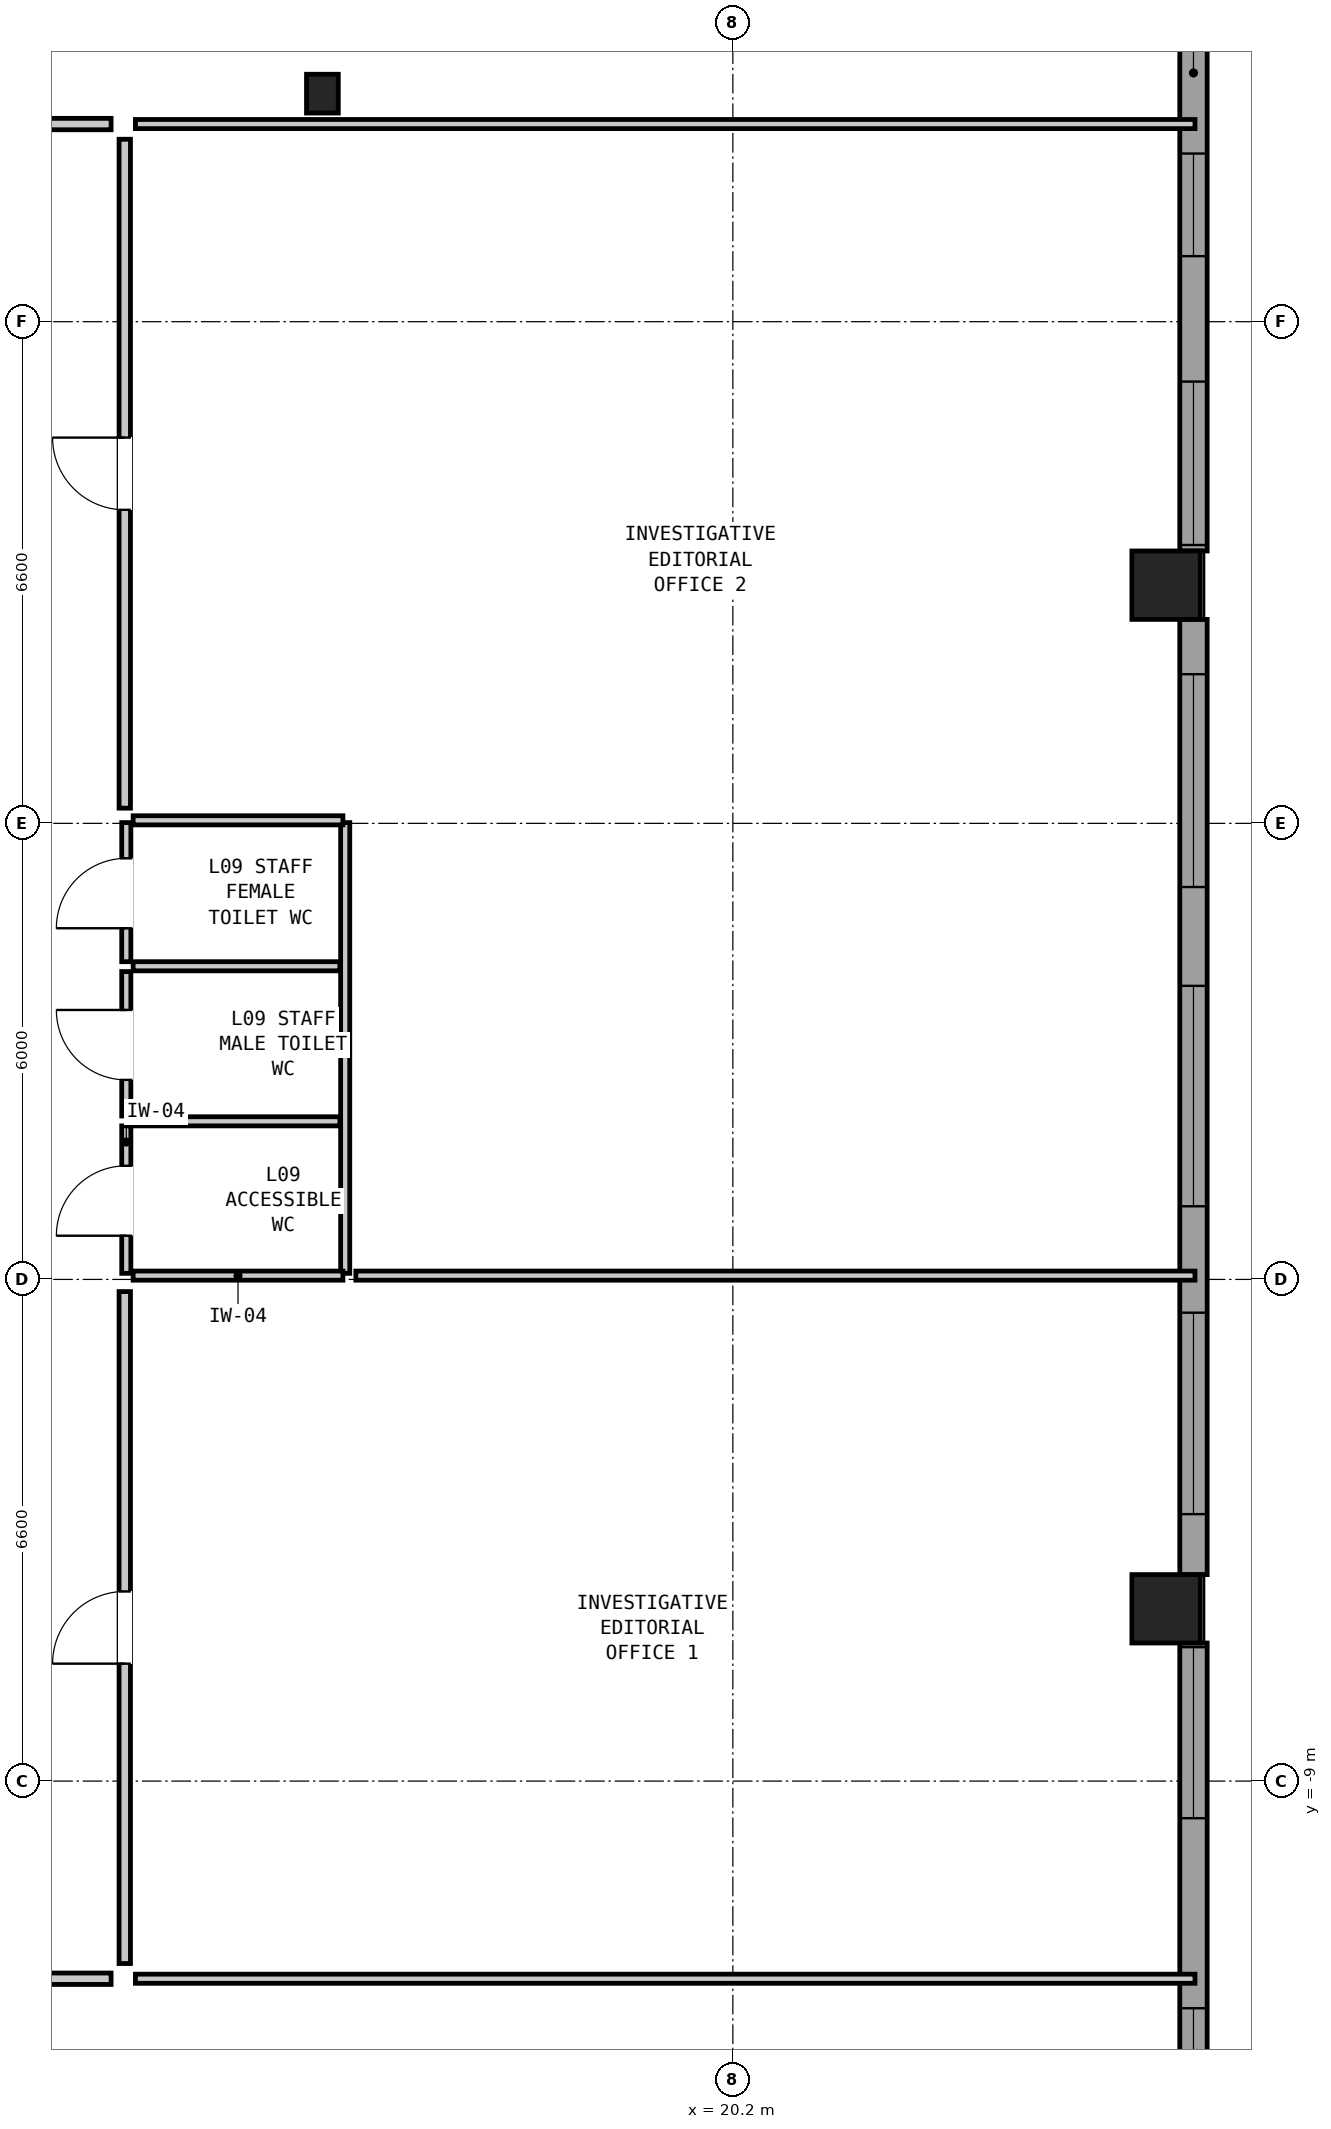
"""IFC4 building model, lengths in metres.
Left out: names, types, materials, properties, quantities, classifications, styles, units other than length and angle.
Written with IfcOpenShell. Run it as: python <this file> out.ifc"""

import sys

from ifc_helpers import new_model, si_unit, direction, frame, frame_2d, origin, origin_2d, place, context, subcontext, project, spatial, rectangle, hollow_rectangle, i_section, extrude, element, fill, save


model = new_model("IFC4")
c1 = context("Model", 3, precision=1e-05, world=origin(), true_north=direction((0.0, 1.0)))
c2 = subcontext(c1, "Body", "Model", "MODEL_VIEW")
j1 = project(units=[si_unit("LENGTHUNIT", "METRE"), si_unit("PLANEANGLEUNIT", "RADIAN")], contexts=[c1])
p1 = place(None, origin())
s1 = spatial("IfcSite", under=j1, at=p1, CompositionType="ELEMENT")
p2 = place(p1, origin())
s2 = spatial("IfcBuilding", under=s1, at=p2, CompositionType="ELEMENT")
p3 = place(p2, frame((0.0, 0.0, 35.25)))
s3 = spatial("IfcBuildingStorey", under=s2, at=p3, CompositionType="ELEMENT", Elevation=35.25)
for number, where, z_axis, x_axis in (
    (1, (25.9, -6.733, 0.0), (0.0, 0.0, 1.0), (0.0, 1.0, 0.0)),
    (2, (25.9, 6.733, 0.0), (0.0, 0.0, 1.0), (0.0, 1.0, 0.0)),
):
    element("IfcColumn", number, at=place(p3, frame(where, z_axis=z_axis, x_axis=x_axis)), inside=s3, PredefinedType="COLUMN", context=c2, shape_type="SweptSolid", body=[
        extrude(hollow_rectangle(XDim=0.9, YDim=0.9, WallThickness=0.055, at=origin_2d()), origin(), (0.0, 0.0, 1.0), 3.05),
    ])
p4 = place(p3, frame((14.8, 13.2, 0.0), z_axis=(0.0, 0.0, 1.0), x_axis=(1.0, 0.0, 0.0)))
e3 = element("IfcColumn", 3, at=p4, inside=s3, PredefinedType="COLUMN", context=c2, shape_type="SweptSolid", body=[
    extrude(i_section(OverallWidth=0.418, OverallDepth=0.51, WebThickness=0.042, FlangeThickness=0.068, at=origin_2d()), origin(), (0.0, 0.0, 1.0), 3.05),
])
p5 = place(p3, frame((26.26, 19.762, 0.0), z_axis=(0.0, 0.0, 1.0), x_axis=(0.0, -1.0, 0.0)))
e4 = element("IfcWall", 4, at=p5, inside=s3, PredefinedType="SOLIDWALL", context=c2, shape_type="SweptSolid", body=[
    extrude(rectangle(XDim=12.579, YDim=0.36, at=frame_2d((6.289, 0.0))), origin(), (0.0, 0.0, 1.0), 2.067),
])
p6 = place(p5, frame((1.8, 0.0, 0.2)))
e5 = element("IfcOpeningElement", 5, at=p6, cuts=e4, PredefinedType="OPENING", context=c2, shape_type="SweptSolid", body=[
    extrude(rectangle(XDim=2.65, YDim=1.05, at=frame_2d((1.325, 0.525))), frame((0.0, 0.192, 0.0), z_axis=(0.0, -1.0, 0.0), x_axis=(1.0, 0.0, 0.0)), (0.0, 0.0, 1.0), 0.384),
])
p7 = place(p5, frame((7.35, 0.0, 0.9)))
e6 = element("IfcOpeningElement", 6, at=p7, cuts=e4, PredefinedType="OPENING", context=c2, shape_type="SweptSolid", body=[
    extrude(rectangle(XDim=1.35, YDim=1.0, at=frame_2d((0.675, 0.5))), frame((0.0, 0.192, 0.0), z_axis=(0.0, -1.0, 0.0), x_axis=(1.0, 0.0, 0.0)), (0.0, 0.0, 1.0), 0.384),
])
p8 = place(p5, frame((10.35, 0.0, 0.2)))
e7 = element("IfcOpeningElement", 7, at=p8, cuts=e4, PredefinedType="OPENING", context=c2, shape_type="SweptSolid", body=[
    extrude(rectangle(XDim=2.15, YDim=1.2, at=frame_2d((1.075, 0.6))), frame((0.0, 0.192, 0.0), z_axis=(0.0, -1.0, 0.0), x_axis=(1.0, 0.0, 0.0)), (0.0, 0.0, 1.0), 0.384),
])
p9 = place(p3, frame((26.26, 6.283, 0.0), z_axis=(0.0, 0.0, 1.0), x_axis=(0.0, -1.0, 0.0)))
e8 = element("IfcWall", 8, at=p9, inside=s3, PredefinedType="SOLIDWALL", context=c2, shape_type="SweptSolid", body=[
    extrude(rectangle(XDim=12.566, YDim=0.36, at=frame_2d((6.283, 0.0))), origin(), (0.0, 0.0, 1.0), 2.067),
])
p10 = place(p9, frame((0.721, 0.0, 0.9)))
e9 = element("IfcOpeningElement", 9, at=p10, cuts=e8, PredefinedType="OPENING", context=c2, shape_type="SweptSolid", body=[
    extrude(rectangle(XDim=2.8, YDim=1.0, at=frame_2d((1.4, 0.5))), frame((0.0, 0.192, 0.0), z_axis=(0.0, -1.0, 0.0), x_axis=(1.0, 0.0, 0.0)), (0.0, 0.0, 1.0), 0.384),
])
p11 = place(p9, frame((4.821, 0.0, 0.2)))
e10 = element("IfcOpeningElement", 10, at=p11, cuts=e8, PredefinedType="OPENING", context=c2, shape_type="SweptSolid", body=[
    extrude(rectangle(XDim=2.9, YDim=0.95, at=frame_2d((1.45, 0.475))), frame((0.0, 0.192, 0.0), z_axis=(0.0, -1.0, 0.0), x_axis=(1.0, 0.0, 0.0)), (0.0, 0.0, 1.0), 0.384),
])
p12 = place(p9, frame((9.121, 0.0, 0.85)))
e11 = element("IfcOpeningElement", 11, at=p12, cuts=e8, PredefinedType="OPENING", context=c2, shape_type="SweptSolid", body=[
    extrude(rectangle(XDim=2.65, YDim=1.05, at=frame_2d((1.325, 0.525))), frame((0.0, 0.192, 0.0), z_axis=(0.0, -1.0, 0.0), x_axis=(1.0, 0.0, 0.0)), (0.0, 0.0, 1.0), 0.384),
])
p13 = place(p3, frame((26.26, -7.183, 0.0), z_axis=(0.0, 0.0, 1.0), x_axis=(0.0, -1.0, 0.0)))
e12 = element("IfcWall", 12, at=p13, inside=s3, PredefinedType="SOLIDWALL", context=c2, shape_type="SweptSolid", body=[
    extrude(rectangle(XDim=12.579, YDim=0.36, at=frame_2d((6.289, 0.0))), origin(), (0.0, 0.0, 1.0), 2.067),
])
p14 = place(p13, frame((0.055, 0.0, 0.2)))
e13 = element("IfcOpeningElement", 13, at=p14, cuts=e12, PredefinedType="OPENING", context=c2, shape_type="SweptSolid", body=[
    extrude(rectangle(XDim=2.25, YDim=1.15, at=frame_2d((1.125, 0.575))), frame((0.0, 0.192, 0.0), z_axis=(0.0, -1.0, 0.0), x_axis=(1.0, 0.0, 0.0)), (0.0, 0.0, 1.0), 0.384),
])
p15 = place(p13, frame((4.805, 0.0, 0.8)))
e14 = element("IfcOpeningElement", 14, at=p15, cuts=e12, PredefinedType="OPENING", context=c2, shape_type="SweptSolid", body=[
    extrude(rectangle(XDim=1.75, YDim=1.1, at=frame_2d((0.875, 0.55))), frame((0.0, 0.192, 0.0), z_axis=(0.0, -1.0, 0.0), x_axis=(1.0, 0.0, 0.0)), (0.0, 0.0, 1.0), 0.384),
])
p16 = place(p13, frame((8.055, 0.0, 0.2)))
e15 = element("IfcOpeningElement", 15, at=p16, cuts=e12, PredefinedType="OPENING", context=c2, shape_type="SweptSolid", body=[
    extrude(rectangle(XDim=2.8, YDim=1.0, at=frame_2d((1.4, 0.5))), frame((0.0, 0.192, 0.0), z_axis=(0.0, -1.0, 0.0), x_axis=(1.0, 0.0, 0.0)), (0.0, 0.0, 1.0), 0.384),
])
p17 = place(p3, frame((12.22, -2.32, 0.0), z_axis=(0.0, 0.0, 1.0), x_axis=(0.0, 1.0, 0.0)))
e16 = element("IfcWall", 16, at=p17, inside=s3, PredefinedType="PARTITIONING", context=c2, shape_type="SweptSolid", body=[
    extrude(rectangle(XDim=1.94, YDim=0.12, at=frame_2d((0.97, 0.0))), origin(), (0.0, 0.0, 1.0), 2.83),
])
p18 = place(p17, frame((0.495, 0.0, 0.0)))
e17 = element("IfcOpeningElement", 17, at=p18, cuts=e16, PredefinedType="OPENING", context=c2, shape_type="SweptSolid", body=[
    extrude(rectangle(XDim=0.92, YDim=2.1, at=frame_2d((0.46, 1.05))), frame((0.0, 0.072, 0.0), z_axis=(0.0, -1.0, 0.0), x_axis=(1.0, 0.0, 0.0)), (0.0, 0.0, 1.0), 0.144),
])
p19 = place(p3, frame((12.22, -0.25, 0.0), z_axis=(0.0, 0.0, 1.0), x_axis=(0.0, 1.0, 0.0)))
e18 = element("IfcWall", 18, at=p19, inside=s3, PredefinedType="PARTITIONING", context=c2, shape_type="SweptSolid", body=[
    extrude(rectangle(XDim=1.9, YDim=0.12, at=frame_2d((0.95, 0.0))), origin(), (0.0, 0.0, 1.0), 2.83),
])
p20 = place(p19, frame((0.475, 0.0, 0.0)))
e19 = element("IfcOpeningElement", 19, at=p20, cuts=e18, PredefinedType="OPENING", context=c2, shape_type="SweptSolid", body=[
    extrude(rectangle(XDim=0.92, YDim=2.1, at=frame_2d((0.46, 1.05))), frame((0.0, 0.072, 0.0), z_axis=(0.0, -1.0, 0.0), x_axis=(1.0, 0.0, 0.0)), (0.0, 0.0, 1.0), 0.144),
])
p21 = place(p3, frame((12.22, 1.78, 0.0), z_axis=(0.0, 0.0, 1.0), x_axis=(0.0, 1.0, 0.0)))
e20 = element("IfcWall", 20, at=p21, inside=s3, PredefinedType="PARTITIONING", context=c2, shape_type="SweptSolid", body=[
    extrude(rectangle(XDim=1.83, YDim=0.12, at=frame_2d((0.915, 0.0))), origin(), (0.0, 0.0, 1.0), 2.83),
])
p22 = place(p21, frame((0.44, 0.0, 0.0)))
e21 = element("IfcOpeningElement", 21, at=p22, cuts=e20, PredefinedType="OPENING", context=c2, shape_type="SweptSolid", body=[
    extrude(rectangle(XDim=0.92, YDim=2.1, at=frame_2d((0.46, 1.05))), frame((0.0, 0.072, 0.0), z_axis=(0.0, -1.0, 0.0), x_axis=(1.0, 0.0, 0.0)), (0.0, 0.0, 1.0), 0.144),
])
p23 = place(p3, frame((15.1, -2.32, 0.0), z_axis=(0.0, 0.0, 1.0), x_axis=(0.0, 1.0, 0.0)))
e22 = element("IfcWall", 22, at=p23, inside=s3, PredefinedType="PARTITIONING", context=c2, shape_type="SweptSolid", body=[
    extrude(rectangle(XDim=5.93, YDim=0.12, at=frame_2d((2.965, 0.0))), origin(), (0.0, 0.0, 1.0), 2.83),
])
for number, where, z_axis, x_axis in (
    (23, (12.31, -2.35, 0.0), (0.0, 0.0, 1.0), (1.0, 0.0, 0.0)),
    (24, (12.31, 3.64, 0.0), (0.0, 0.0, 1.0), (1.0, 0.0, 0.0)),
):
    element("IfcWall", number, at=place(p3, frame(where, z_axis=z_axis, x_axis=x_axis)), inside=s3, PredefinedType="PARTITIONING", context=c2, shape_type="SweptSolid", body=[
        extrude(rectangle(XDim=2.76, YDim=0.12, at=frame_2d((1.38, 0.0))), origin(), (0.0, 0.0, 1.0), 1.799),
    ])
for number, where, z_axis, x_axis in (
    (25, (12.31, -0.32, 0.0), (0.0, 0.0, 1.0), (1.0, 0.0, 0.0)),
    (26, (12.31, 1.72, 0.0), (0.0, 0.0, 1.0), (1.0, 0.0, 0.0)),
):
    element("IfcWall", number, at=place(p3, frame(where, z_axis=z_axis, x_axis=x_axis)), inside=s3, PredefinedType="PARTITIONING", context=c2, shape_type="SweptSolid", body=[
        extrude(rectangle(XDim=2.72, YDim=0.12, at=frame_2d((1.36, 0.0))), origin(), (0.0, 0.0, 1.0), 2.83),
    ])
p24 = place(p3, frame((12.34, 12.8, 0.0), z_axis=(0.0, 0.0, 1.0), x_axis=(1.0, 0.0, 0.0)))
e27 = element("IfcWall", 27, at=p24, inside=s3, PredefinedType="PARTITIONING", context=c2, shape_type="SweptSolid", body=[
    extrude(rectangle(XDim=13.94, YDim=0.12, at=frame_2d((6.97, 0.0))), origin(), (0.0, 0.0, 1.0), 2.83),
])
p25 = place(p3, frame((12.34, -11.6, 0.0), z_axis=(0.0, 0.0, 1.0), x_axis=(1.0, 0.0, 0.0)))
e28 = element("IfcWall", 28, at=p25, inside=s3, PredefinedType="PARTITIONING", context=c2, shape_type="SweptSolid", body=[
    extrude(rectangle(XDim=13.94, YDim=0.12, at=frame_2d((6.97, 0.0))), origin(), (0.0, 0.0, 1.0), 2.274),
])
p26 = place(p3, frame((15.24, -2.35, 0.0), z_axis=(0.0, 0.0, 1.0), x_axis=(1.0, 0.0, 0.0)))
e29 = element("IfcWall", 29, at=p26, inside=s3, PredefinedType="PARTITIONING", context=c2, shape_type="SweptSolid", body=[
    extrude(rectangle(XDim=11.04, YDim=0.12, at=frame_2d((5.52, 0.0))), origin(), (0.0, 0.0, 1.0), 1.799),
])
p27 = place(p3, frame((8.58, 12.8, 0.0), z_axis=(0.0, 0.0, 1.0), x_axis=(1.0, 0.0, 0.0)))
e30 = element("IfcWall", 30, at=p27, inside=s3, PredefinedType="PARTITIONING", context=c2, shape_type="SweptSolid", body=[
    extrude(rectangle(XDim=3.44, YDim=0.15, at=frame_2d((1.72, 0.0))), origin(), (0.0, 0.0, 1.0), 2.83),
])
p28 = place(p27, frame((1.245, 0.0, 0.0)))
e31 = element("IfcOpeningElement", 31, at=p28, cuts=e30, PredefinedType="OPENING", context=c2, shape_type="SweptSolid", body=[
    extrude(rectangle(XDim=0.95, YDim=2.1, at=frame_2d((0.475, 1.05))), frame((0.0, 0.087, 0.0), z_axis=(0.0, -1.0, 0.0), x_axis=(1.0, 0.0, 0.0)), (0.0, 0.0, 1.0), 0.174),
])
p29 = place(p3, frame((8.58, -11.6, 0.0), z_axis=(0.0, 0.0, 1.0), x_axis=(1.0, 0.0, 0.0)))
e32 = element("IfcWall", 32, at=p29, inside=s3, PredefinedType="PARTITIONING", context=c2, shape_type="SweptSolid", body=[
    extrude(rectangle(XDim=3.44, YDim=0.15, at=frame_2d((1.72, 0.0))), origin(), (0.0, 0.0, 1.0), 2.274),
])
p30 = place(p29, frame((1.245, 0.0, 0.0)))
e33 = element("IfcOpeningElement", 33, at=p30, cuts=e32, PredefinedType="OPENING", context=c2, shape_type="SweptSolid", body=[
    extrude(rectangle(XDim=0.95, YDim=2.1, at=frame_2d((0.475, 1.05))), frame((0.0, 0.087, 0.0), z_axis=(0.0, -1.0, 0.0), x_axis=(1.0, 0.0, 0.0)), (0.0, 0.0, 1.0), 0.174),
])
p31 = place(p3, frame((12.2, -11.4, 0.0), z_axis=(0.0, 0.0, 1.0), x_axis=(0.0, 1.0, 0.0)))
e34 = element("IfcWall", 34, at=p31, inside=s3, PredefinedType="PARTITIONING", context=c2, shape_type="SweptSolid", body=[
    extrude(rectangle(XDim=8.84, YDim=0.15, at=frame_2d((4.42, 0.0))), origin(), (0.0, 0.0, 1.0), 2.83),
])
p32 = place(p31, frame((3.945, 0.0, 0.0)))
e35 = element("IfcOpeningElement", 35, at=p32, cuts=e34, PredefinedType="OPENING", context=c2, shape_type="SweptSolid", body=[
    extrude(rectangle(XDim=0.95, YDim=2.1, at=frame_2d((0.475, 1.05))), frame((0.0, 0.087, 0.0), z_axis=(0.0, -1.0, 0.0), x_axis=(1.0, 0.0, 0.0)), (0.0, 0.0, 1.0), 0.174),
])
p33 = place(p3, frame((12.2, 3.8, 0.0), z_axis=(0.0, 0.0, 1.0), x_axis=(0.0, 1.0, 0.0)))
e36 = element("IfcWall", 36, at=p33, inside=s3, PredefinedType="PARTITIONING", context=c2, shape_type="SweptSolid", body=[
    extrude(rectangle(XDim=8.8, YDim=0.15, at=frame_2d((4.4, 0.0))), origin(), (0.0, 0.0, 1.0), 2.83),
])
p34 = place(p33, frame((3.925, 0.0, 0.0)))
e37 = element("IfcOpeningElement", 37, at=p34, cuts=e36, PredefinedType="OPENING", context=c2, shape_type="SweptSolid", body=[
    extrude(rectangle(XDim=0.95, YDim=2.1, at=frame_2d((0.475, 1.05))), frame((0.0, 0.087, 0.0), z_axis=(0.0, -1.0, 0.0), x_axis=(1.0, 0.0, 0.0)), (0.0, 0.0, 1.0), 0.174),
])
p35 = place(p7, origin())
e38 = element("IfcWindow", 38, at=p35, inside=s3, PartitioningType="SINGLE_PANEL", PredefinedType="WINDOW", context=c2, shape_type="SweptSolid", body=[
    extrude(rectangle(XDim=1.35, YDim=1.0, at=frame_2d((0.675, 0.5))), frame((0.0, 0.03, 0.0), z_axis=(0.0, -1.0, 0.0), x_axis=(1.0, 0.0, 0.0)), (0.0, 0.0, 1.0), 0.06),
])
fill(e6, e38)
p36 = place(p8, origin())
e39 = element("IfcWindow", 39, at=p36, inside=s3, PartitioningType="SINGLE_PANEL", PredefinedType="WINDOW", context=c2, shape_type="SweptSolid", body=[
    extrude(rectangle(XDim=2.15, YDim=1.2, at=frame_2d((1.075, 0.6))), frame((0.0, 0.03, 0.0), z_axis=(0.0, -1.0, 0.0), x_axis=(1.0, 0.0, 0.0)), (0.0, 0.0, 1.0), 0.06),
])
fill(e7, e39)
p37 = place(p10, origin())
e40 = element("IfcWindow", 40, at=p37, inside=s3, PartitioningType="SINGLE_PANEL", PredefinedType="WINDOW", context=c2, shape_type="SweptSolid", body=[
    extrude(rectangle(XDim=2.8, YDim=1.0, at=frame_2d((1.4, 0.5))), frame((0.0, 0.03, 0.0), z_axis=(0.0, -1.0, 0.0), x_axis=(1.0, 0.0, 0.0)), (0.0, 0.0, 1.0), 0.06),
])
fill(e9, e40)
p38 = place(p11, origin())
e41 = element("IfcWindow", 41, at=p38, inside=s3, PartitioningType="SINGLE_PANEL", PredefinedType="WINDOW", context=c2, shape_type="SweptSolid", body=[
    extrude(rectangle(XDim=2.9, YDim=0.95, at=frame_2d((1.45, 0.475))), frame((0.0, 0.03, 0.0), z_axis=(0.0, -1.0, 0.0), x_axis=(1.0, 0.0, 0.0)), (0.0, 0.0, 1.0), 0.06),
])
fill(e10, e41)
p39 = place(p12, origin())
e42 = element("IfcWindow", 42, at=p39, inside=s3, PartitioningType="SINGLE_PANEL", PredefinedType="WINDOW", context=c2, shape_type="SweptSolid", body=[
    extrude(rectangle(XDim=2.65, YDim=1.05, at=frame_2d((1.325, 0.525))), frame((0.0, 0.03, 0.0), z_axis=(0.0, -1.0, 0.0), x_axis=(1.0, 0.0, 0.0)), (0.0, 0.0, 1.0), 0.06),
])
fill(e11, e42)
p40 = place(p14, origin())
e43 = element("IfcWindow", 43, at=p40, inside=s3, PartitioningType="SINGLE_PANEL", PredefinedType="WINDOW", context=c2, shape_type="SweptSolid", body=[
    extrude(rectangle(XDim=2.25, YDim=1.15, at=frame_2d((1.125, 0.575))), frame((0.0, 0.03, 0.0), z_axis=(0.0, -1.0, 0.0), x_axis=(1.0, 0.0, 0.0)), (0.0, 0.0, 1.0), 0.06),
])
fill(e13, e43)
p41 = place(p15, origin())
e44 = element("IfcWindow", 44, at=p41, inside=s3, PartitioningType="SINGLE_PANEL", PredefinedType="WINDOW", context=c2, shape_type="SweptSolid", body=[
    extrude(rectangle(XDim=1.75, YDim=1.1, at=frame_2d((0.875, 0.55))), frame((0.0, 0.03, 0.0), z_axis=(0.0, -1.0, 0.0), x_axis=(1.0, 0.0, 0.0)), (0.0, 0.0, 1.0), 0.06),
])
fill(e14, e44)
p42 = place(p18, origin())
e45 = element("IfcDoor", 45, at=p42, inside=s3, OperationType="SINGLE_SWING_LEFT", PredefinedType="DOOR", context=c2, shape_type="SweptSolid", body=[
    extrude(rectangle(XDim=0.92, YDim=2.1, at=frame_2d((0.46, 1.05))), frame((0.0, 0.025, 0.0), z_axis=(0.0, -1.0, 0.0), x_axis=(1.0, 0.0, 0.0)), (0.0, 0.0, 1.0), 0.05),
])
fill(e17, e45)
p43 = place(p20, origin())
e46 = element("IfcDoor", 46, at=p43, inside=s3, OperationType="SINGLE_SWING_RIGHT", PredefinedType="DOOR", context=c2, shape_type="SweptSolid", body=[
    extrude(rectangle(XDim=0.92, YDim=2.1, at=frame_2d((0.46, 1.05))), frame((0.0, 0.025, 0.0), z_axis=(0.0, -1.0, 0.0), x_axis=(1.0, 0.0, 0.0)), (0.0, 0.0, 1.0), 0.05),
])
fill(e19, e46)
p44 = place(p22, origin())
e47 = element("IfcDoor", 47, at=p44, inside=s3, OperationType="SINGLE_SWING_LEFT", PredefinedType="DOOR", context=c2, shape_type="SweptSolid", body=[
    extrude(rectangle(XDim=0.92, YDim=2.1, at=frame_2d((0.46, 1.05))), frame((0.0, 0.025, 0.0), z_axis=(0.0, -1.0, 0.0), x_axis=(1.0, 0.0, 0.0)), (0.0, 0.0, 1.0), 0.05),
])
fill(e21, e47)
p45 = place(p32, origin())
e48 = element("IfcDoor", 48, at=p45, inside=s3, OperationType="SINGLE_SWING_LEFT", PredefinedType="DOOR", context=c2, shape_type="SweptSolid", body=[
    extrude(rectangle(XDim=0.95, YDim=2.1, at=frame_2d((0.475, 1.05))), frame((0.0, 0.025, 0.0), z_axis=(0.0, -1.0, 0.0), x_axis=(1.0, 0.0, 0.0)), (0.0, 0.0, 1.0), 0.05),
])
fill(e35, e48)
p46 = place(p34, origin())
e49 = element("IfcDoor", 49, at=p46, inside=s3, OperationType="SINGLE_SWING_RIGHT", PredefinedType="DOOR", context=c2, shape_type="SweptSolid", body=[
    extrude(rectangle(XDim=0.95, YDim=2.1, at=frame_2d((0.475, 1.05))), frame((0.0, 0.025, 0.0), z_axis=(0.0, -1.0, 0.0), x_axis=(1.0, 0.0, 0.0)), (0.0, 0.0, 1.0), 0.05),
])
fill(e37, e49)
save(model, sys.argv[1])
